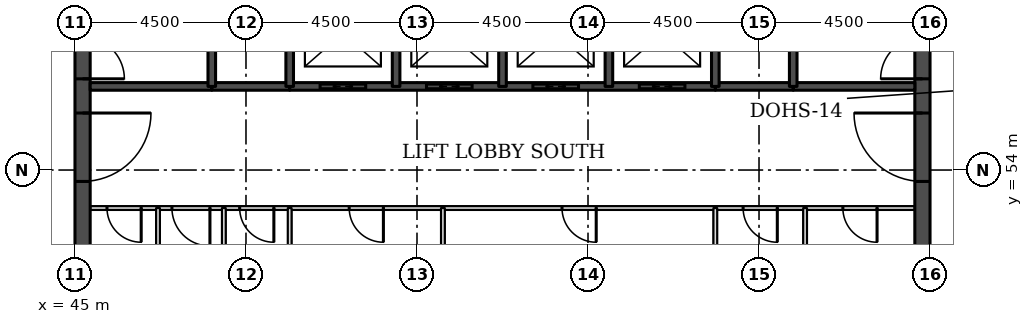
"""IFC4 building model, lengths in metres.
Left out: names, types, materials, properties, quantities, classifications, styles, units other than length and angle.
Written with IfcOpenShell. Run it as: python <this file> out.ifc"""

import sys

from ifc_helpers import new_model, si_unit, direction, frame, frame_2d, origin, place, context, subcontext, project, spatial, rectangle, extrude, element, fill, save


model = new_model("IFC4")
c1 = context("Model", 3, precision=1e-05, world=origin(), true_north=direction((0.0, 1.0)))
c2 = subcontext(c1, "Body", "Model", "MODEL_VIEW")
j1 = project(units=[si_unit("LENGTHUNIT", "METRE"), si_unit("PLANEANGLEUNIT", "RADIAN")], contexts=[c1])
p1 = place(None, origin())
s1 = spatial("IfcSite", under=j1, at=p1, CompositionType="ELEMENT")
p2 = place(p1, origin())
s2 = spatial("IfcBuilding", under=s1, at=p2, CompositionType="ELEMENT")
p3 = place(p2, frame((0.0, 0.0, 260.0)))
s3 = spatial("IfcBuildingStorey", under=s2, at=p3, CompositionType="ELEMENT", Elevation=260.0)
p4 = place(p3, frame((45.2, 49.5, 0.0), z_axis=(0.0, 0.0, 1.0), x_axis=(0.0, 1.0, 0.0)))
e1 = element("IfcWall", 1, at=p4, inside=s3, PredefinedType="SHEAR", context=c2, shape_type="SweptSolid", body=[
    extrude(rectangle(XDim=22.5, YDim=0.4, at=frame_2d((11.25, 0.0))), origin(), (0.0, 0.0, 1.0), 3.7),
])
p5 = place(p4, frame((4.2, 0.0, 0.0)))
e2 = element("IfcOpeningElement", 2, at=p5, cuts=e1, PredefinedType="OPENING", context=c2, shape_type="SweptSolid", body=[
    extrude(rectangle(XDim=1.8, YDim=2.1, at=frame_2d((0.9, 1.05))), frame((0.0, 0.21, 0.0), z_axis=(0.0, -1.0, 0.0), x_axis=(1.0, 0.0, 0.0)), (0.0, 0.0, 1.0), 0.42),
])
p6 = place(p4, frame((6.9, 0.0, 0.0)))
e3 = element("IfcOpeningElement", 3, at=p6, cuts=e1, PredefinedType="OPENING", context=c2, shape_type="SweptSolid", body=[
    extrude(rectangle(XDim=1.1, YDim=2.1, at=frame_2d((0.55, 1.05))), frame((0.0, 0.21, 0.0), z_axis=(0.0, -1.0, 0.0), x_axis=(1.0, 0.0, 0.0)), (0.0, 0.0, 1.0), 0.42),
])
p7 = place(p4, frame((13.6, 0.0, 0.0)))
e4 = element("IfcOpeningElement", 4, at=p7, cuts=e1, PredefinedType="OPENING", context=c2, shape_type="SweptSolid", body=[
    extrude(rectangle(XDim=1.1, YDim=2.1, at=frame_2d((0.55, 1.05))), frame((0.0, 0.21, 0.0), z_axis=(0.0, -1.0, 0.0), x_axis=(1.0, 0.0, 0.0)), (0.0, 0.0, 1.0), 0.42),
])
p8 = place(p4, frame((16.5, 0.0, 0.0)))
e5 = element("IfcOpeningElement", 5, at=p8, cuts=e1, PredefinedType="OPENING", context=c2, shape_type="SweptSolid", body=[
    extrude(rectangle(XDim=1.8, YDim=2.1, at=frame_2d((0.9, 1.05))), frame((0.0, 0.21, 0.0), z_axis=(0.0, -1.0, 0.0), x_axis=(1.0, 0.0, 0.0)), (0.0, 0.0, 1.0), 0.42),
])
p9 = place(p3, frame((67.3, 49.5, 0.0), z_axis=(0.0, 0.0, 1.0), x_axis=(0.0, 1.0, 0.0)))
e6 = element("IfcWall", 6, at=p9, inside=s3, PredefinedType="SHEAR", context=c2, shape_type="SweptSolid", body=[
    extrude(rectangle(XDim=22.5, YDim=0.4, at=frame_2d((11.25, 0.0))), origin(), (0.0, 0.0, 1.0), 3.7),
])
p10 = place(p9, frame((4.2, 0.0, 0.0)))
e7 = element("IfcOpeningElement", 7, at=p10, cuts=e6, PredefinedType="OPENING", context=c2, shape_type="SweptSolid", body=[
    extrude(rectangle(XDim=1.8, YDim=2.1, at=frame_2d((0.9, 1.05))), frame((0.0, 0.21, 0.0), z_axis=(0.0, -1.0, 0.0), x_axis=(1.0, 0.0, 0.0)), (0.0, 0.0, 1.0), 0.42),
])
p11 = place(p9, frame((6.9, 0.0, 0.0)))
e8 = element("IfcOpeningElement", 8, at=p11, cuts=e6, PredefinedType="OPENING", context=c2, shape_type="SweptSolid", body=[
    extrude(rectangle(XDim=1.1, YDim=2.1, at=frame_2d((0.55, 1.05))), frame((0.0, 0.21, 0.0), z_axis=(0.0, -1.0, 0.0), x_axis=(1.0, 0.0, 0.0)), (0.0, 0.0, 1.0), 0.42),
])
p12 = place(p9, frame((13.6, 0.0, 0.0)))
e9 = element("IfcOpeningElement", 9, at=p12, cuts=e6, PredefinedType="OPENING", context=c2, shape_type="SweptSolid", body=[
    extrude(rectangle(XDim=1.1, YDim=2.1, at=frame_2d((0.55, 1.05))), frame((0.0, 0.21, 0.0), z_axis=(0.0, -1.0, 0.0), x_axis=(1.0, 0.0, 0.0)), (0.0, 0.0, 1.0), 0.42),
])
p13 = place(p9, frame((16.5, 0.0, 0.0)))
e10 = element("IfcOpeningElement", 10, at=p13, cuts=e6, PredefinedType="OPENING", context=c2, shape_type="SweptSolid", body=[
    extrude(rectangle(XDim=1.8, YDim=2.1, at=frame_2d((0.9, 1.05))), frame((0.0, 0.21, 0.0), z_axis=(0.0, -1.0, 0.0), x_axis=(1.0, 0.0, 0.0)), (0.0, 0.0, 1.0), 0.42),
])
p14 = place(p3, frame((45.4, 53.0, 0.0), z_axis=(0.0, 0.0, 1.0), x_axis=(1.0, 0.0, 0.0)))
e11 = element("IfcWall", 11, at=p14, inside=s3, PredefinedType="PARTITIONING", context=c2, shape_type="SweptSolid", body=[
    extrude(rectangle(XDim=21.7, YDim=0.1, at=frame_2d((10.85, 0.0))), origin(), (0.0, 0.0, 1.0), 3.45),
])
p15 = place(p14, frame((19.806, 0.0, 0.0)))
e12 = element("IfcOpeningElement", 12, at=p15, cuts=e11, PredefinedType="OPENING", context=c2, shape_type="SweptSolid", body=[
    extrude(rectangle(XDim=0.9, YDim=2.1, at=frame_2d((0.45, 1.05))), frame((0.0, 0.06, 0.0), z_axis=(0.0, -1.0, 0.0), x_axis=(1.0, 0.0, 0.0)), (0.0, 0.0, 1.0), 0.12),
])
p16 = place(p14, frame((17.181, 0.0, 0.0)))
e13 = element("IfcOpeningElement", 13, at=p16, cuts=e11, PredefinedType="OPENING", context=c2, shape_type="SweptSolid", body=[
    extrude(rectangle(XDim=0.9, YDim=2.1, at=frame_2d((0.45, 1.05))), frame((0.0, 0.06, 0.0), z_axis=(0.0, -1.0, 0.0), x_axis=(1.0, 0.0, 0.0)), (0.0, 0.0, 1.0), 0.12),
])
p17 = place(p14, frame((0.442, 0.0, 0.0)))
e14 = element("IfcOpeningElement", 14, at=p17, cuts=e11, PredefinedType="OPENING", context=c2, shape_type="SweptSolid", body=[
    extrude(rectangle(XDim=0.9, YDim=2.1, at=frame_2d((0.45, 1.05))), frame((0.0, 0.06, 0.0), z_axis=(0.0, -1.0, 0.0), x_axis=(1.0, 0.0, 0.0)), (0.0, 0.0, 1.0), 0.12),
])
p18 = place(p14, frame((2.151, 0.0, 0.0)))
e15 = element("IfcOpeningElement", 15, at=p18, cuts=e11, PredefinedType="OPENING", context=c2, shape_type="SweptSolid", body=[
    extrude(rectangle(XDim=1.0, YDim=2.1, at=frame_2d((0.5, 1.05))), frame((0.0, 0.06, 0.0), z_axis=(0.0, -1.0, 0.0), x_axis=(1.0, 0.0, 0.0)), (0.0, 0.0, 1.0), 0.12),
])
p19 = place(p14, frame((3.934, 0.0, 0.0)))
e16 = element("IfcOpeningElement", 16, at=p19, cuts=e11, PredefinedType="OPENING", context=c2, shape_type="SweptSolid", body=[
    extrude(rectangle(XDim=0.9, YDim=2.1, at=frame_2d((0.45, 1.05))), frame((0.0, 0.06, 0.0), z_axis=(0.0, -1.0, 0.0), x_axis=(1.0, 0.0, 0.0)), (0.0, 0.0, 1.0), 0.12),
])
p20 = place(p14, frame((6.816, 0.0, 0.0)))
e17 = element("IfcOpeningElement", 17, at=p20, cuts=e11, PredefinedType="OPENING", context=c2, shape_type="SweptSolid", body=[
    extrude(rectangle(XDim=0.9, YDim=2.1, at=frame_2d((0.45, 1.05))), frame((0.0, 0.06, 0.0), z_axis=(0.0, -1.0, 0.0), x_axis=(1.0, 0.0, 0.0)), (0.0, 0.0, 1.0), 0.12),
])
p21 = place(p14, frame((12.416, 0.0, 0.0)))
e18 = element("IfcOpeningElement", 18, at=p21, cuts=e11, PredefinedType="OPENING", context=c2, shape_type="SweptSolid", body=[
    extrude(rectangle(XDim=0.9, YDim=2.1, at=frame_2d((0.45, 1.05))), frame((0.0, 0.06, 0.0), z_axis=(0.0, -1.0, 0.0), x_axis=(1.0, 0.0, 0.0)), (0.0, 0.0, 1.0), 0.12),
])
for number, where, z_axis, x_axis in (
    (19, (48.6, 56.2, 0.0), (0.0, 0.0, 1.0), (1.0, 0.0, 0.0)),
    (20, (61.85, 56.2, 0.0), (0.0, 0.0, 1.0), (1.0, 0.0, 0.0)),
):
    element("IfcWall", number, at=place(p3, frame(where, z_axis=z_axis, x_axis=x_axis)), inside=s3, PredefinedType="SOLIDWALL", context=c2, shape_type="SweptSolid", body=[
        extrude(rectangle(XDim=2.05, YDim=0.2, at=frame_2d((1.025, 0.0))), origin(), (0.0, 0.0, 1.0), 3.45),
    ])
p22 = place(p3, frame((45.4, 56.2, 0.0), z_axis=(0.0, 0.0, 1.0), x_axis=(1.0, 0.0, 0.0)))
e21 = element("IfcWall", 21, at=p22, inside=s3, PredefinedType="SOLIDWALL", context=c2, shape_type="SweptSolid", body=[
    extrude(rectangle(XDim=3.2, YDim=0.2, at=frame_2d((1.6, 0.0))), origin(), (0.0, 0.0, 1.0), 3.45),
])
p23 = place(p3, frame((50.65, 56.2, 0.0), z_axis=(0.0, 0.0, 1.0), x_axis=(1.0, 0.0, 0.0)))
e22 = element("IfcWall", 22, at=p23, inside=s3, PredefinedType="SOLIDWALL", context=c2, shape_type="SweptSolid", body=[
    extrude(rectangle(XDim=11.2, YDim=0.2, at=frame_2d((5.6, 0.0))), origin(), (0.0, 0.0, 1.0), 3.45),
])
p24 = place(p23, frame((0.8, 0.0, 0.0)))
e23 = element("IfcOpeningElement", 23, at=p24, cuts=e22, PredefinedType="OPENING", context=c2, shape_type="SweptSolid", body=[
    extrude(rectangle(XDim=1.2, YDim=2.1, at=frame_2d((0.6, 1.05))), frame((0.0, 0.11, 0.0), z_axis=(0.0, -1.0, 0.0), x_axis=(1.0, 0.0, 0.0)), (0.0, 0.0, 1.0), 0.22),
])
p25 = place(p23, frame((3.6, 0.0, 0.0)))
e24 = element("IfcOpeningElement", 24, at=p25, cuts=e22, PredefinedType="OPENING", context=c2, shape_type="SweptSolid", body=[
    extrude(rectangle(XDim=1.2, YDim=2.1, at=frame_2d((0.6, 1.05))), frame((0.0, 0.11, 0.0), z_axis=(0.0, -1.0, 0.0), x_axis=(1.0, 0.0, 0.0)), (0.0, 0.0, 1.0), 0.22),
])
p26 = place(p23, frame((6.4, 0.0, 0.0)))
e25 = element("IfcOpeningElement", 25, at=p26, cuts=e22, PredefinedType="OPENING", context=c2, shape_type="SweptSolid", body=[
    extrude(rectangle(XDim=1.2, YDim=2.1, at=frame_2d((0.6, 1.05))), frame((0.0, 0.11, 0.0), z_axis=(0.0, -1.0, 0.0), x_axis=(1.0, 0.0, 0.0)), (0.0, 0.0, 1.0), 0.22),
])
p27 = place(p23, frame((9.2, 0.0, 0.0)))
e26 = element("IfcOpeningElement", 26, at=p27, cuts=e22, PredefinedType="OPENING", context=c2, shape_type="SweptSolid", body=[
    extrude(rectangle(XDim=1.2, YDim=2.1, at=frame_2d((0.6, 1.05))), frame((0.0, 0.11, 0.0), z_axis=(0.0, -1.0, 0.0), x_axis=(1.0, 0.0, 0.0)), (0.0, 0.0, 1.0), 0.22),
])
p28 = place(p3, frame((63.9, 56.2, 0.0), z_axis=(0.0, 0.0, 1.0), x_axis=(1.0, 0.0, 0.0)))
e27 = element("IfcWall", 27, at=p28, inside=s3, PredefinedType="SOLIDWALL", context=c2, shape_type="SweptSolid", body=[
    extrude(rectangle(XDim=3.2, YDim=0.2, at=frame_2d((1.6, 0.0))), origin(), (0.0, 0.0, 1.0), 3.45),
])
p29 = place(p3, frame((47.185, 49.9, 0.0), z_axis=(0.0, 0.0, 1.0), x_axis=(0.0, 1.0, 0.0)))
e28 = element("IfcWall", 28, at=p29, inside=s3, PredefinedType="PARTITIONING", context=c2, shape_type="SweptSolid", body=[
    extrude(rectangle(XDim=3.1, YDim=0.1, at=frame_2d((1.55, 0.0))), origin(), (0.0, 0.0, 1.0), 3.45),
])
p30 = place(p3, frame((48.6, 56.2, 0.0), z_axis=(0.0, 0.0, 1.0), x_axis=(0.0, 1.0, 0.0)))
e29 = element("IfcWall", 29, at=p30, inside=s3, PredefinedType="SOLIDWALL", context=c2, shape_type="SweptSolid", body=[
    extrude(rectangle(XDim=5.8, YDim=0.2, at=frame_2d((2.9, 0.0))), origin(), (0.0, 0.0, 1.0), 3.45),
])
for number, where, z_axis, x_axis in (
    (30, (48.917, 49.9, 0.0), (0.0, 0.0, 1.0), (0.0, 1.0, 0.0)),
    (31, (50.65, 49.9, 0.0), (0.0, 0.0, 1.0), (0.0, 1.0, 0.0)),
):
    element("IfcWall", number, at=place(p3, frame(where, z_axis=z_axis, x_axis=x_axis)), inside=s3, PredefinedType="PARTITIONING", context=c2, shape_type="SweptSolid", body=[
        extrude(rectangle(XDim=3.1, YDim=0.1, at=frame_2d((1.55, 0.0))), origin(), (0.0, 0.0, 1.0), 3.45),
    ])
for number, where, z_axis, x_axis in (
    (32, (50.65, 56.2, 0.0), (0.0, 0.0, 1.0), (0.0, 1.0, 0.0)),
    (33, (53.45, 56.2, 0.0), (0.0, 0.0, 1.0), (0.0, 1.0, 0.0)),
):
    element("IfcWall", number, at=place(p3, frame(where, z_axis=z_axis, x_axis=x_axis)), inside=s3, PredefinedType="SOLIDWALL", context=c2, shape_type="SweptSolid", body=[
        extrude(rectangle(XDim=2.8, YDim=0.2, at=frame_2d((1.4, 0.0))), origin(), (0.0, 0.0, 1.0), 3.45),
    ])
p31 = place(p3, frame((54.682, 49.9, 0.0), z_axis=(0.0, 0.0, 1.0), x_axis=(0.0, 1.0, 0.0)))
e34 = element("IfcWall", 34, at=p31, inside=s3, PredefinedType="PARTITIONING", context=c2, shape_type="SweptSolid", body=[
    extrude(rectangle(XDim=3.1, YDim=0.1, at=frame_2d((1.55, 0.0))), origin(), (0.0, 0.0, 1.0), 3.45),
])
for number, where, z_axis, x_axis in (
    (35, (56.25, 56.2, 0.0), (0.0, 0.0, 1.0), (0.0, 1.0, 0.0)),
    (36, (59.05, 56.2, 0.0), (0.0, 0.0, 1.0), (0.0, 1.0, 0.0)),
):
    element("IfcWall", number, at=place(p3, frame(where, z_axis=z_axis, x_axis=x_axis)), inside=s3, PredefinedType="SOLIDWALL", context=c2, shape_type="SweptSolid", body=[
        extrude(rectangle(XDim=2.8, YDim=0.2, at=frame_2d((1.4, 0.0))), origin(), (0.0, 0.0, 1.0), 3.45),
    ])
p32 = place(p3, frame((61.85, 49.9, 0.0), z_axis=(0.0, 0.0, 1.0), x_axis=(0.0, 1.0, 0.0)))
e37 = element("IfcWall", 37, at=p32, inside=s3, PredefinedType="PARTITIONING", context=c2, shape_type="SweptSolid", body=[
    extrude(rectangle(XDim=3.1, YDim=0.1, at=frame_2d((1.55, 0.0))), origin(), (0.0, 0.0, 1.0), 3.45),
])
p33 = place(p3, frame((61.85, 56.2, 0.0), z_axis=(0.0, 0.0, 1.0), x_axis=(0.0, 1.0, 0.0)))
e38 = element("IfcWall", 38, at=p33, inside=s3, PredefinedType="SOLIDWALL", context=c2, shape_type="SweptSolid", body=[
    extrude(rectangle(XDim=2.8, YDim=0.2, at=frame_2d((1.4, 0.0))), origin(), (0.0, 0.0, 1.0), 3.45),
])
p34 = place(p3, frame((63.9, 56.2, 0.0), z_axis=(0.0, 0.0, 1.0), x_axis=(0.0, 1.0, 0.0)))
e39 = element("IfcWall", 39, at=p34, inside=s3, PredefinedType="SOLIDWALL", context=c2, shape_type="SweptSolid", body=[
    extrude(rectangle(XDim=5.8, YDim=0.2, at=frame_2d((2.9, 0.0))), origin(), (0.0, 0.0, 1.0), 3.45),
])
p35 = place(p3, frame((64.212, 49.9, 0.0), z_axis=(0.0, 0.0, 1.0), x_axis=(0.0, 1.0, 0.0)))
e40 = element("IfcWall", 40, at=p35, inside=s3, PredefinedType="PARTITIONING", context=c2, shape_type="SweptSolid", body=[
    extrude(rectangle(XDim=3.1, YDim=0.1, at=frame_2d((1.55, 0.0))), origin(), (0.0, 0.0, 1.0), 3.45),
])
p36 = place(p24, origin())
e41 = element("IfcDoor", 41, at=p36, inside=s3, OperationType="DOUBLE_DOOR_SLIDING", PredefinedType="DOOR", context=c2, shape_type="SweptSolid", body=[
    extrude(rectangle(XDim=1.2, YDim=2.1, at=frame_2d((0.6, 1.05))), frame((0.0, 0.025, 0.0), z_axis=(0.0, -1.0, 0.0), x_axis=(1.0, 0.0, 0.0)), (0.0, 0.0, 1.0), 0.05),
])
fill(e23, e41)
p37 = place(p25, origin())
e42 = element("IfcDoor", 42, at=p37, inside=s3, OperationType="DOUBLE_DOOR_SLIDING", PredefinedType="DOOR", context=c2, shape_type="SweptSolid", body=[
    extrude(rectangle(XDim=1.2, YDim=2.1, at=frame_2d((0.6, 1.05))), frame((0.0, 0.025, 0.0), z_axis=(0.0, -1.0, 0.0), x_axis=(1.0, 0.0, 0.0)), (0.0, 0.0, 1.0), 0.05),
])
fill(e24, e42)
p38 = place(p26, origin())
e43 = element("IfcDoor", 43, at=p38, inside=s3, OperationType="DOUBLE_DOOR_SLIDING", PredefinedType="DOOR", context=c2, shape_type="SweptSolid", body=[
    extrude(rectangle(XDim=1.2, YDim=2.1, at=frame_2d((0.6, 1.05))), frame((0.0, 0.025, 0.0), z_axis=(0.0, -1.0, 0.0), x_axis=(1.0, 0.0, 0.0)), (0.0, 0.0, 1.0), 0.05),
])
fill(e25, e43)
p39 = place(p27, origin())
e44 = element("IfcDoor", 44, at=p39, inside=s3, OperationType="DOUBLE_DOOR_SLIDING", PredefinedType="DOOR", context=c2, shape_type="SweptSolid", body=[
    extrude(rectangle(XDim=1.2, YDim=2.1, at=frame_2d((0.6, 1.05))), frame((0.0, 0.025, 0.0), z_axis=(0.0, -1.0, 0.0), x_axis=(1.0, 0.0, 0.0)), (0.0, 0.0, 1.0), 0.05),
])
fill(e26, e44)
p40 = place(p5, frame((1.8, 0.0, 0.0), z_axis=(0.0, 0.0, 1.0), x_axis=(-1.0, 0.0, 0.0)))
e45 = element("IfcDoor", 45, at=p40, inside=s3, OperationType="SINGLE_SWING_LEFT", PredefinedType="DOOR", context=c2, shape_type="SweptSolid", body=[
    extrude(rectangle(XDim=1.8, YDim=2.1, at=frame_2d((0.9, 1.05))), frame((0.0, 0.025, 0.0), z_axis=(0.0, -1.0, 0.0), x_axis=(1.0, 0.0, 0.0)), (0.0, 0.0, 1.0), 0.05),
])
fill(e2, e45)
p41 = place(p6, frame((1.1, 0.0, 0.0), z_axis=(0.0, 0.0, 1.0), x_axis=(-1.0, 0.0, 0.0)))
e46 = element("IfcDoor", 46, at=p41, inside=s3, OperationType="SINGLE_SWING_RIGHT", PredefinedType="DOOR", context=c2, shape_type="SweptSolid", body=[
    extrude(rectangle(XDim=1.1, YDim=2.1, at=frame_2d((0.55, 1.05))), frame((0.0, 0.025, 0.0), z_axis=(0.0, -1.0, 0.0), x_axis=(1.0, 0.0, 0.0)), (0.0, 0.0, 1.0), 0.05),
])
fill(e3, e46)
p42 = place(p10, origin())
e47 = element("IfcDoor", 47, at=p42, inside=s3, OperationType="SINGLE_SWING_RIGHT", PredefinedType="DOOR", context=c2, shape_type="SweptSolid", body=[
    extrude(rectangle(XDim=1.8, YDim=2.1, at=frame_2d((0.9, 1.05))), frame((0.0, 0.025, 0.0), z_axis=(0.0, -1.0, 0.0), x_axis=(1.0, 0.0, 0.0)), (0.0, 0.0, 1.0), 0.05),
])
fill(e7, e47)
p43 = place(p11, origin())
e48 = element("IfcDoor", 48, at=p43, inside=s3, OperationType="SINGLE_SWING_LEFT", PredefinedType="DOOR", context=c2, shape_type="SweptSolid", body=[
    extrude(rectangle(XDim=1.1, YDim=2.1, at=frame_2d((0.55, 1.05))), frame((0.0, 0.025, 0.0), z_axis=(0.0, -1.0, 0.0), x_axis=(1.0, 0.0, 0.0)), (0.0, 0.0, 1.0), 0.05),
])
fill(e8, e48)
p44 = place(p15, frame((0.9, 0.0, 0.0), z_axis=(0.0, 0.0, 1.0), x_axis=(-1.0, 0.0, 0.0)))
e49 = element("IfcDoor", 49, at=p44, inside=s3, OperationType="SINGLE_SWING_LEFT", PredefinedType="DOOR", context=c2, shape_type="SweptSolid", body=[
    extrude(rectangle(XDim=0.9, YDim=2.1, at=frame_2d((0.45, 1.05))), frame((0.0, 0.025, 0.0), z_axis=(0.0, -1.0, 0.0), x_axis=(1.0, 0.0, 0.0)), (0.0, 0.0, 1.0), 0.05),
])
fill(e12, e49)
p45 = place(p16, frame((0.9, 0.0, 0.0), z_axis=(0.0, 0.0, 1.0), x_axis=(-1.0, 0.0, 0.0)))
e50 = element("IfcDoor", 50, at=p45, inside=s3, OperationType="SINGLE_SWING_LEFT", PredefinedType="DOOR", context=c2, shape_type="SweptSolid", body=[
    extrude(rectangle(XDim=0.9, YDim=2.1, at=frame_2d((0.45, 1.05))), frame((0.0, 0.025, 0.0), z_axis=(0.0, -1.0, 0.0), x_axis=(1.0, 0.0, 0.0)), (0.0, 0.0, 1.0), 0.05),
])
fill(e13, e50)
p46 = place(p17, frame((0.9, 0.0, 0.0), z_axis=(0.0, 0.0, 1.0), x_axis=(-1.0, 0.0, 0.0)))
e51 = element("IfcDoor", 51, at=p46, inside=s3, OperationType="SINGLE_SWING_LEFT", PredefinedType="DOOR", context=c2, shape_type="SweptSolid", body=[
    extrude(rectangle(XDim=0.9, YDim=2.1, at=frame_2d((0.45, 1.05))), frame((0.0, 0.025, 0.0), z_axis=(0.0, -1.0, 0.0), x_axis=(1.0, 0.0, 0.0)), (0.0, 0.0, 1.0), 0.05),
])
fill(e14, e51)
p47 = place(p18, frame((1.0, 0.0, 0.0), z_axis=(0.0, 0.0, 1.0), x_axis=(-1.0, 0.0, 0.0)))
e52 = element("IfcDoor", 52, at=p47, inside=s3, OperationType="SINGLE_SWING_LEFT", PredefinedType="DOOR", context=c2, shape_type="SweptSolid", body=[
    extrude(rectangle(XDim=1.0, YDim=2.1, at=frame_2d((0.5, 1.05))), frame((0.0, 0.025, 0.0), z_axis=(0.0, -1.0, 0.0), x_axis=(1.0, 0.0, 0.0)), (0.0, 0.0, 1.0), 0.05),
])
fill(e15, e52)
p48 = place(p19, frame((0.9, 0.0, 0.0), z_axis=(0.0, 0.0, 1.0), x_axis=(-1.0, 0.0, 0.0)))
e53 = element("IfcDoor", 53, at=p48, inside=s3, OperationType="SINGLE_SWING_LEFT", PredefinedType="DOOR", context=c2, shape_type="SweptSolid", body=[
    extrude(rectangle(XDim=0.9, YDim=2.1, at=frame_2d((0.45, 1.05))), frame((0.0, 0.025, 0.0), z_axis=(0.0, -1.0, 0.0), x_axis=(1.0, 0.0, 0.0)), (0.0, 0.0, 1.0), 0.05),
])
fill(e16, e53)
p49 = place(p20, frame((0.9, 0.0, 0.0), z_axis=(0.0, 0.0, 1.0), x_axis=(-1.0, 0.0, 0.0)))
e54 = element("IfcDoor", 54, at=p49, inside=s3, OperationType="SINGLE_SWING_LEFT", PredefinedType="DOOR", context=c2, shape_type="SweptSolid", body=[
    extrude(rectangle(XDim=0.9, YDim=2.1, at=frame_2d((0.45, 1.05))), frame((0.0, 0.025, 0.0), z_axis=(0.0, -1.0, 0.0), x_axis=(1.0, 0.0, 0.0)), (0.0, 0.0, 1.0), 0.05),
])
fill(e17, e54)
p50 = place(p21, frame((0.9, 0.0, 0.0), z_axis=(0.0, 0.0, 1.0), x_axis=(-1.0, 0.0, 0.0)))
e55 = element("IfcDoor", 55, at=p50, inside=s3, OperationType="SINGLE_SWING_LEFT", PredefinedType="DOOR", context=c2, shape_type="SweptSolid", body=[
    extrude(rectangle(XDim=0.9, YDim=2.1, at=frame_2d((0.45, 1.05))), frame((0.0, 0.025, 0.0), z_axis=(0.0, -1.0, 0.0), x_axis=(1.0, 0.0, 0.0)), (0.0, 0.0, 1.0), 0.05),
])
fill(e18, e55)
save(model, sys.argv[1])
